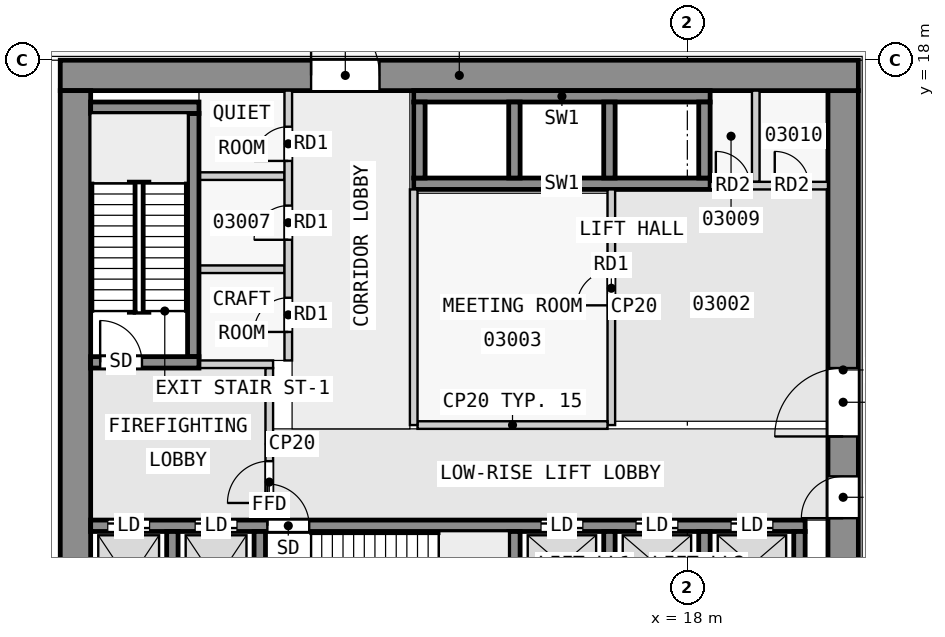
"""IFC4 building model, lengths in metres.
Left out: names, types, materials, properties, quantities, classifications, styles, units other than length and angle.
Written with IfcOpenShell. Run it as: python <this file> out.ifc"""

import sys

from ifc_helpers import new_model, si_unit, direction, frame, frame_2d, origin, place, context, subcontext, project, spatial, rectangle, extrude, element, fill, save


model = new_model("IFC4")
c1 = context("Model", 3, precision=1e-05, world=origin(), true_north=direction((0.0, 1.0)))
c2 = subcontext(c1, "Body", "Model", "MODEL_VIEW")
j1 = project(units=[si_unit("LENGTHUNIT", "METRE"), si_unit("PLANEANGLEUNIT", "RADIAN")], contexts=[c1])
p1 = place(None, origin())
s1 = spatial("IfcSite", under=j1, at=p1, CompositionType="ELEMENT")
p2 = place(p1, origin())
s2 = spatial("IfcBuilding", under=s1, at=p2, CompositionType="ELEMENT")
p3 = place(p2, frame((0.0, 0.0, 17.3)))
s3 = spatial("IfcBuildingStorey", under=s2, at=p3, CompositionType="ELEMENT", Elevation=17.3)
p4 = place(p3, frame((1.5, 17.6, 0.0), z_axis=(0.0, 0.0, 1.0), x_axis=(1.0, 0.0, 0.0)))
e1 = element("IfcWall", 1, at=p4, inside=s3, PredefinedType="SHEAR", context=c2, shape_type="SweptSolid", body=[
    extrude(rectangle(XDim=21.0, YDim=0.8, at=frame_2d((10.5, 0.0))), origin(), (0.0, 0.0, 1.0), 4.15),
])
p5 = place(p4, frame((6.6, 0.0, 0.0)))
e2 = element("IfcOpeningElement", 2, at=p5, cuts=e1, PredefinedType="OPENING", context=c2, shape_type="SweptSolid", body=[
    extrude(rectangle(XDim=1.8, YDim=2.1, at=frame_2d((0.9, 1.05))), frame((0.0, 0.41, 0.0), z_axis=(0.0, -1.0, 0.0), x_axis=(1.0, 0.0, 0.0)), (0.0, 0.0, 1.0), 0.82),
])
p6 = place(p3, frame((1.9, 2.5, 0.0), z_axis=(0.0, 0.0, 1.0), x_axis=(0.0, 1.0, 0.0)))
e3 = element("IfcWall", 3, at=p6, inside=s3, PredefinedType="SHEAR", context=c2, shape_type="SweptSolid", body=[
    extrude(rectangle(XDim=14.7, YDim=0.8, at=frame_2d((7.35, 0.0))), origin(), (0.0, 0.0, 1.0), 4.15),
])
p7 = place(p3, frame((22.1, 2.5, 0.0), z_axis=(0.0, 0.0, 1.0), x_axis=(0.0, 1.0, 0.0)))
e4 = element("IfcWall", 4, at=p7, inside=s3, PredefinedType="SHEAR", context=c2, shape_type="SweptSolid", body=[
    extrude(rectangle(XDim=14.7, YDim=0.8, at=frame_2d((7.35, 0.0))), origin(), (0.0, 0.0, 1.0), 4.15),
])
p8 = place(p7, frame((5.6, 0.0, 0.0)))
e5 = element("IfcOpeningElement", 5, at=p8, cuts=e4, PredefinedType="OPENING", context=c2, shape_type="SweptSolid", body=[
    extrude(rectangle(XDim=1.8, YDim=2.1, at=frame_2d((0.9, 1.05))), frame((0.0, 0.41, 0.0), z_axis=(0.0, -1.0, 0.0), x_axis=(1.0, 0.0, 0.0)), (0.0, 0.0, 1.0), 0.82),
])
p9 = place(p7, frame((3.45, 0.0, 0.0)))
e6 = element("IfcOpeningElement", 6, at=p9, cuts=e4, PredefinedType="OPENING", context=c2, shape_type="SweptSolid", body=[
    extrude(rectangle(XDim=1.1, YDim=2.1, at=frame_2d((0.55, 1.05))), frame((0.0, 0.41, 0.0), z_axis=(0.0, -1.0, 0.0), x_axis=(1.0, 0.0, 0.0)), (0.0, 0.0, 1.0), 0.82),
])
for number, where, z_axis, x_axis in (
    (7, (4.45, 2.8, 0.0), (0.0, 0.0, 1.0), (0.0, 1.0, 0.0)),
    (8, (6.75, 2.8, 0.0), (0.0, 0.0, 1.0), (0.0, 1.0, 0.0)),
    (9, (13.45, 2.8, 0.0), (0.0, 0.0, 1.0), (0.0, 1.0, 0.0)),
    (10, (15.95, 2.8, 0.0), (0.0, 0.0, 1.0), (0.0, 1.0, 0.0)),
    (11, (18.45, 2.8, 0.0), (0.0, 0.0, 1.0), (0.0, 1.0, 0.0)),
    (12, (20.95, 2.8, 0.0), (0.0, 0.0, 1.0), (0.0, 1.0, 0.0)),
):
    element("IfcWall", number, at=place(p3, frame(where, z_axis=z_axis, x_axis=x_axis)), inside=s3, PredefinedType="SHEAR", context=c2, shape_type="SweptSolid", body=[
        extrude(rectangle(XDim=2.8, YDim=0.3, at=frame_2d((1.4, 0.0))), origin(), (0.0, 0.0, 1.0), 4.15),
    ])
p10 = place(p3, frame((2.3, 5.75, 0.0), z_axis=(0.0, 0.0, 1.0), x_axis=(1.0, 0.0, 0.0)))
e13 = element("IfcWall", 13, at=p10, inside=s3, PredefinedType="SHEAR", context=c2, shape_type="SweptSolid", body=[
    extrude(rectangle(XDim=18.8, YDim=0.3, at=frame_2d((9.4, 0.0))), origin(), (0.0, 0.0, 1.0), 4.15),
])
p11 = place(p10, frame((4.65, 0.0, 0.0)))
e14 = element("IfcOpeningElement", 14, at=p11, cuts=e13, PredefinedType="OPENING", context=c2, shape_type="SweptSolid", body=[
    extrude(rectangle(XDim=1.1, YDim=2.1, at=frame_2d((0.55, 1.05))), frame((0.0, 0.16, 0.0), z_axis=(0.0, -1.0, 0.0), x_axis=(1.0, 0.0, 0.0)), (0.0, 0.0, 1.0), 0.32),
])
p12 = place(p10, frame((0.45, 0.0, 0.0)))
e15 = element("IfcOpeningElement", 15, at=p12, cuts=e13, PredefinedType="OPENING", context=c2, shape_type="SweptSolid", body=[
    extrude(rectangle(XDim=1.1, YDim=2.1, at=frame_2d((0.55, 1.05))), frame((0.0, 0.16, 0.0), z_axis=(0.0, -1.0, 0.0), x_axis=(1.0, 0.0, 0.0)), (0.0, 0.0, 1.0), 0.32),
])
p13 = place(p10, frame((2.75, 0.0, 0.0)))
e16 = element("IfcOpeningElement", 16, at=p13, cuts=e13, PredefinedType="OPENING", context=c2, shape_type="SweptSolid", body=[
    extrude(rectangle(XDim=1.1, YDim=2.1, at=frame_2d((0.55, 1.05))), frame((0.0, 0.16, 0.0), z_axis=(0.0, -1.0, 0.0), x_axis=(1.0, 0.0, 0.0)), (0.0, 0.0, 1.0), 0.32),
])
p14 = place(p10, frame((11.85, 0.0, 0.0)))
e17 = element("IfcOpeningElement", 17, at=p14, cuts=e13, PredefinedType="OPENING", context=c2, shape_type="SweptSolid", body=[
    extrude(rectangle(XDim=1.1, YDim=2.1, at=frame_2d((0.55, 1.05))), frame((0.0, 0.16, 0.0), z_axis=(0.0, -1.0, 0.0), x_axis=(1.0, 0.0, 0.0)), (0.0, 0.0, 1.0), 0.32),
])
p15 = place(p10, frame((14.35, 0.0, 0.0)))
e18 = element("IfcOpeningElement", 18, at=p15, cuts=e13, PredefinedType="OPENING", context=c2, shape_type="SweptSolid", body=[
    extrude(rectangle(XDim=1.1, YDim=2.1, at=frame_2d((0.55, 1.05))), frame((0.0, 0.16, 0.0), z_axis=(0.0, -1.0, 0.0), x_axis=(1.0, 0.0, 0.0)), (0.0, 0.0, 1.0), 0.32),
])
p16 = place(p10, frame((16.85, 0.0, 0.0)))
e19 = element("IfcOpeningElement", 19, at=p16, cuts=e13, PredefinedType="OPENING", context=c2, shape_type="SweptSolid", body=[
    extrude(rectangle(XDim=1.1, YDim=2.1, at=frame_2d((0.55, 1.05))), frame((0.0, 0.16, 0.0), z_axis=(0.0, -1.0, 0.0), x_axis=(1.0, 0.0, 0.0)), (0.0, 0.0, 1.0), 0.32),
])
p17 = place(p3, frame((2.3, 10.05, 0.0), z_axis=(0.0, 0.0, 1.0), x_axis=(1.0, 0.0, 0.0)))
e20 = element("IfcWall", 20, at=p17, inside=s3, PredefinedType="SHEAR", context=c2, shape_type="SweptSolid", body=[
    extrude(rectangle(XDim=2.85, YDim=0.3, at=frame_2d((1.425, 0.0))), origin(), (0.0, 0.0, 1.0), 4.15),
])
p18 = place(p17, frame((0.25, 0.0, 0.0)))
e21 = element("IfcOpeningElement", 21, at=p18, cuts=e20, PredefinedType="OPENING", context=c2, shape_type="SweptSolid", body=[
    extrude(rectangle(XDim=1.1, YDim=2.1, at=frame_2d((0.55, 1.05))), frame((0.0, 0.16, 0.0), z_axis=(0.0, -1.0, 0.0), x_axis=(1.0, 0.0, 0.0)), (0.0, 0.0, 1.0), 0.32),
])
p19 = place(p3, frame((5.0, 10.2, 0.0), z_axis=(0.0, 0.0, 1.0), x_axis=(0.0, 1.0, 0.0)))
e22 = element("IfcWall", 22, at=p19, inside=s3, PredefinedType="SHEAR", context=c2, shape_type="SweptSolid", body=[
    extrude(rectangle(XDim=6.4, YDim=0.3, at=frame_2d((3.2, 0.0))), origin(), (0.0, 0.0, 1.0), 4.15),
])
p20 = place(p3, frame((2.3, 16.75, 0.0), z_axis=(0.0, 0.0, 1.0), x_axis=(1.0, 0.0, 0.0)))
e23 = element("IfcWall", 23, at=p20, inside=s3, PredefinedType="SHEAR", context=c2, shape_type="SweptSolid", body=[
    extrude(rectangle(XDim=2.85, YDim=0.3, at=frame_2d((1.425, 0.0))), origin(), (0.0, 0.0, 1.0), 4.15),
])
for number, where, z_axis, x_axis in (
    (24, (10.8, 17.05, 0.0), (0.0, 0.0, 1.0), (1.0, 0.0, 0.0)),
    (25, (10.8, 14.75, 0.0), (0.0, 0.0, 1.0), (1.0, 0.0, 0.0)),
):
    element("IfcWall", number, at=place(p3, frame(where, z_axis=z_axis, x_axis=x_axis)), inside=s3, PredefinedType="SHEAR", context=c2, shape_type="SweptSolid", body=[
        extrude(rectangle(XDim=7.8, YDim=0.3, at=frame_2d((3.9, 0.0))), origin(), (0.0, 0.0, 1.0), 4.15),
    ])
for number, where, z_axis, x_axis in (
    (26, (10.95, 14.9, 0.0), (0.0, 0.0, 1.0), (0.0, 1.0, 0.0)),
    (27, (13.45, 14.9, 0.0), (0.0, 0.0, 1.0), (0.0, 1.0, 0.0)),
    (28, (15.95, 14.9, 0.0), (0.0, 0.0, 1.0), (0.0, 1.0, 0.0)),
    (29, (18.45, 14.9, 0.0), (0.0, 0.0, 1.0), (0.0, 1.0, 0.0)),
):
    element("IfcWall", number, at=place(p3, frame(where, z_axis=z_axis, x_axis=x_axis)), inside=s3, PredefinedType="SHEAR", context=c2, shape_type="SweptSolid", body=[
        extrude(rectangle(XDim=2.0, YDim=0.3, at=frame_2d((1.0, 0.0))), origin(), (0.0, 0.0, 1.0), 4.15),
    ])
p21 = place(p3, frame((7.0, 5.9, 0.0), z_axis=(0.0, 0.0, 1.0), x_axis=(0.0, 1.0, 0.0)))
e30 = element("IfcWall", 30, at=p21, inside=s3, PredefinedType="PARTITIONING", context=c2, shape_type="SweptSolid", body=[
    extrude(rectangle(XDim=4.0, YDim=0.2, at=frame_2d((2.0, 0.0))), origin(), (0.0, 0.0, 1.0), 4.15),
])
p22 = place(p21, frame((0.45, 0.0, 0.0)))
e31 = element("IfcOpeningElement", 31, at=p22, cuts=e30, PredefinedType="OPENING", context=c2, shape_type="SweptSolid", body=[
    extrude(rectangle(XDim=1.1, YDim=2.1, at=frame_2d((0.55, 1.05))), frame((0.0, 0.11, 0.0), z_axis=(0.0, -1.0, 0.0), x_axis=(1.0, 0.0, 0.0)), (0.0, 0.0, 1.0), 0.22),
])
p23 = place(p3, frame((5.15, 10.0, 0.0), z_axis=(0.0, 0.0, 1.0), x_axis=(1.0, 0.0, 0.0)))
e32 = element("IfcWall", 32, at=p23, inside=s3, PredefinedType="PARTITIONING", context=c2, shape_type="SweptSolid", body=[
    extrude(rectangle(XDim=1.95, YDim=0.2, at=frame_2d((0.975, 0.0))), origin(), (0.0, 0.0, 1.0), 4.15),
])
p24 = place(p3, frame((10.8, 8.4, 0.0), z_axis=(0.0, 0.0, 1.0), x_axis=(0.0, 1.0, 0.0)))
e33 = element("IfcWall", 33, at=p24, inside=s3, PredefinedType="PARTITIONING", context=c2, shape_type="SweptSolid", body=[
    extrude(rectangle(XDim=6.2, YDim=0.2, at=frame_2d((3.1, 0.0))), origin(), (0.0, 0.0, 1.0), 4.15),
])
p25 = place(p3, frame((10.9, 8.4, 0.0), z_axis=(0.0, 0.0, 1.0), x_axis=(1.0, 0.0, 0.0)))
e34 = element("IfcWall", 34, at=p25, inside=s3, PredefinedType="PARTITIONING", context=c2, shape_type="SweptSolid", body=[
    extrude(rectangle(XDim=5.0, YDim=0.2, at=frame_2d((2.5, 0.0))), origin(), (0.0, 0.0, 1.0), 4.15),
])
p26 = place(p3, frame((16.0, 8.4, 0.0), z_axis=(0.0, 0.0, 1.0), x_axis=(0.0, 1.0, 0.0)))
e35 = element("IfcWall", 35, at=p26, inside=s3, PredefinedType="PARTITIONING", context=c2, shape_type="SweptSolid", body=[
    extrude(rectangle(XDim=6.2, YDim=0.2, at=frame_2d((3.1, 0.0))), origin(), (0.0, 0.0, 1.0), 4.15),
])
p27 = place(p26, frame((3.15, 0.0, 0.0)))
e36 = element("IfcOpeningElement", 36, at=p27, cuts=e35, PredefinedType="OPENING", context=c2, shape_type="SweptSolid", body=[
    extrude(rectangle(XDim=0.9, YDim=2.1, at=frame_2d((0.45, 1.05))), frame((0.0, 0.11, 0.0), z_axis=(0.0, -1.0, 0.0), x_axis=(1.0, 0.0, 0.0)), (0.0, 0.0, 1.0), 0.22),
])
p28 = place(p3, frame((7.5, 10.1, 0.0), z_axis=(0.0, 0.0, 1.0), x_axis=(0.0, 1.0, 0.0)))
e37 = element("IfcWall", 37, at=p28, inside=s3, PredefinedType="PARTITIONING", context=c2, shape_type="SweptSolid", body=[
    extrude(rectangle(XDim=7.1, YDim=0.2, at=frame_2d((3.55, 0.0))), origin(), (0.0, 0.0, 1.0), 4.15),
])
p29 = place(p28, frame((0.75, 0.0, 0.0)))
e38 = element("IfcOpeningElement", 38, at=p29, cuts=e37, PredefinedType="OPENING", context=c2, shape_type="SweptSolid", body=[
    extrude(rectangle(XDim=0.9, YDim=2.1, at=frame_2d((0.45, 1.05))), frame((0.0, 0.11, 0.0), z_axis=(0.0, -1.0, 0.0), x_axis=(1.0, 0.0, 0.0)), (0.0, 0.0, 1.0), 0.22),
])
p30 = place(p28, frame((3.175, 0.0, 0.0)))
e39 = element("IfcOpeningElement", 39, at=p30, cuts=e37, PredefinedType="OPENING", context=c2, shape_type="SweptSolid", body=[
    extrude(rectangle(XDim=0.9, YDim=2.1, at=frame_2d((0.45, 1.05))), frame((0.0, 0.11, 0.0), z_axis=(0.0, -1.0, 0.0), x_axis=(1.0, 0.0, 0.0)), (0.0, 0.0, 1.0), 0.22),
])
p31 = place(p28, frame((5.25, 0.0, 0.0)))
e40 = element("IfcOpeningElement", 40, at=p31, cuts=e37, PredefinedType="OPENING", context=c2, shape_type="SweptSolid", body=[
    extrude(rectangle(XDim=0.9, YDim=2.1, at=frame_2d((0.45, 1.05))), frame((0.0, 0.11, 0.0), z_axis=(0.0, -1.0, 0.0), x_axis=(1.0, 0.0, 0.0)), (0.0, 0.0, 1.0), 0.22),
])
for number, where, z_axis, x_axis in (
    (41, (5.15, 12.5, 0.0), (0.0, 0.0, 1.0), (1.0, 0.0, 0.0)),
    (42, (5.15, 14.95, 0.0), (0.0, 0.0, 1.0), (1.0, 0.0, 0.0)),
):
    element("IfcWall", number, at=place(p3, frame(where, z_axis=z_axis, x_axis=x_axis)), inside=s3, PredefinedType="PARTITIONING", context=c2, shape_type="SweptSolid", body=[
        extrude(rectangle(XDim=2.25, YDim=0.2, at=frame_2d((1.125, 0.0))), origin(), (0.0, 0.0, 1.0), 4.15),
    ])
p32 = place(p3, frame((18.6, 14.7, 0.0), z_axis=(0.0, 0.0, 1.0), x_axis=(1.0, 0.0, 0.0)))
e43 = element("IfcWall", 43, at=p32, inside=s3, PredefinedType="PARTITIONING", context=c2, shape_type="SweptSolid", body=[
    extrude(rectangle(XDim=3.1, YDim=0.2, at=frame_2d((1.55, 0.0))), origin(), (0.0, 0.0, 1.0), 4.15),
])
p33 = place(p32, frame((0.15, 0.0, 0.0)))
e44 = element("IfcOpeningElement", 44, at=p33, cuts=e43, PredefinedType="OPENING", context=c2, shape_type="SweptSolid", body=[
    extrude(rectangle(XDim=0.9, YDim=2.1, at=frame_2d((0.45, 1.05))), frame((0.0, 0.11, 0.0), z_axis=(0.0, -1.0, 0.0), x_axis=(1.0, 0.0, 0.0)), (0.0, 0.0, 1.0), 0.22),
])
p34 = place(p32, frame((1.7, 0.0, 0.0)))
e45 = element("IfcOpeningElement", 45, at=p34, cuts=e43, PredefinedType="OPENING", context=c2, shape_type="SweptSolid", body=[
    extrude(rectangle(XDim=0.9, YDim=2.1, at=frame_2d((0.45, 1.05))), frame((0.0, 0.11, 0.0), z_axis=(0.0, -1.0, 0.0), x_axis=(1.0, 0.0, 0.0)), (0.0, 0.0, 1.0), 0.22),
])
p35 = place(p3, frame((19.8, 14.8, 0.0), z_axis=(0.0, 0.0, 1.0), x_axis=(0.0, 1.0, 0.0)))
e46 = element("IfcWall", 46, at=p35, inside=s3, PredefinedType="PARTITIONING", context=c2, shape_type="SweptSolid", body=[
    extrude(rectangle(XDim=2.4, YDim=0.2, at=frame_2d((1.2, 0.0))), origin(), (0.0, 0.0, 1.0), 4.15),
])
p36 = place(p22, origin())
e47 = element("IfcDoor", 47, at=p36, inside=s3, OperationType="SINGLE_SWING_LEFT", PredefinedType="DOOR", context=c2, shape_type="SweptSolid", body=[
    extrude(rectangle(XDim=1.1, YDim=2.1, at=frame_2d((0.55, 1.05))), frame((0.0, 0.025, 0.0), z_axis=(0.0, -1.0, 0.0), x_axis=(1.0, 0.0, 0.0)), (0.0, 0.0, 1.0), 0.05),
])
fill(e31, e47)
p37 = place(p18, origin())
e48 = element("IfcDoor", 48, at=p37, inside=s3, OperationType="SINGLE_SWING_RIGHT", PredefinedType="DOOR", context=c2, shape_type="SweptSolid", body=[
    extrude(rectangle(XDim=1.1, YDim=2.1, at=frame_2d((0.55, 1.05))), frame((0.0, 0.025, 0.0), z_axis=(0.0, -1.0, 0.0), x_axis=(1.0, 0.0, 0.0)), (0.0, 0.0, 1.0), 0.05),
])
fill(e21, e48)
p38 = place(p27, origin())
e49 = element("IfcDoor", 49, at=p38, inside=s3, OperationType="SINGLE_SWING_LEFT", PredefinedType="DOOR", context=c2, shape_type="SweptSolid", body=[
    extrude(rectangle(XDim=0.9, YDim=2.1, at=frame_2d((0.45, 1.05))), frame((0.0, 0.025, 0.0), z_axis=(0.0, -1.0, 0.0), x_axis=(1.0, 0.0, 0.0)), (0.0, 0.0, 1.0), 0.05),
])
fill(e36, e49)
p39 = place(p11, origin())
e50 = element("IfcDoor", 50, at=p39, inside=s3, OperationType="SINGLE_SWING_LEFT", PredefinedType="DOOR", context=c2, shape_type="SweptSolid", body=[
    extrude(rectangle(XDim=1.1, YDim=2.1, at=frame_2d((0.55, 1.05))), frame((0.0, 0.025, 0.0), z_axis=(0.0, -1.0, 0.0), x_axis=(1.0, 0.0, 0.0)), (0.0, 0.0, 1.0), 0.05),
])
fill(e14, e50)
p40 = place(p12, origin())
e51 = element("IfcDoor", 51, at=p40, inside=s3, OperationType="DOUBLE_DOOR_SLIDING", PredefinedType="DOOR", context=c2, shape_type="SweptSolid", body=[
    extrude(rectangle(XDim=1.1, YDim=2.1, at=frame_2d((0.55, 1.05))), frame((0.0, 0.025, 0.0), z_axis=(0.0, -1.0, 0.0), x_axis=(1.0, 0.0, 0.0)), (0.0, 0.0, 1.0), 0.05),
])
fill(e15, e51)
p41 = place(p13, origin())
e52 = element("IfcDoor", 52, at=p41, inside=s3, OperationType="DOUBLE_DOOR_SLIDING", PredefinedType="DOOR", context=c2, shape_type="SweptSolid", body=[
    extrude(rectangle(XDim=1.1, YDim=2.1, at=frame_2d((0.55, 1.05))), frame((0.0, 0.025, 0.0), z_axis=(0.0, -1.0, 0.0), x_axis=(1.0, 0.0, 0.0)), (0.0, 0.0, 1.0), 0.05),
])
fill(e16, e52)
p42 = place(p14, origin())
e53 = element("IfcDoor", 53, at=p42, inside=s3, OperationType="DOUBLE_DOOR_SLIDING", PredefinedType="DOOR", context=c2, shape_type="SweptSolid", body=[
    extrude(rectangle(XDim=1.1, YDim=2.1, at=frame_2d((0.55, 1.05))), frame((0.0, 0.025, 0.0), z_axis=(0.0, -1.0, 0.0), x_axis=(1.0, 0.0, 0.0)), (0.0, 0.0, 1.0), 0.05),
])
fill(e17, e53)
p43 = place(p15, origin())
e54 = element("IfcDoor", 54, at=p43, inside=s3, OperationType="DOUBLE_DOOR_SLIDING", PredefinedType="DOOR", context=c2, shape_type="SweptSolid", body=[
    extrude(rectangle(XDim=1.1, YDim=2.1, at=frame_2d((0.55, 1.05))), frame((0.0, 0.025, 0.0), z_axis=(0.0, -1.0, 0.0), x_axis=(1.0, 0.0, 0.0)), (0.0, 0.0, 1.0), 0.05),
])
fill(e18, e54)
p44 = place(p16, origin())
e55 = element("IfcDoor", 55, at=p44, inside=s3, OperationType="DOUBLE_DOOR_SLIDING", PredefinedType="DOOR", context=c2, shape_type="SweptSolid", body=[
    extrude(rectangle(XDim=1.1, YDim=2.1, at=frame_2d((0.55, 1.05))), frame((0.0, 0.025, 0.0), z_axis=(0.0, -1.0, 0.0), x_axis=(1.0, 0.0, 0.0)), (0.0, 0.0, 1.0), 0.05),
])
fill(e19, e55)
p45 = place(p8, origin())
e56 = element("IfcDoor", 56, at=p45, inside=s3, OperationType="DOUBLE_DOOR_SINGLE_SWING", PredefinedType="DOOR", context=c2, shape_type="SweptSolid", body=[
    extrude(rectangle(XDim=1.8, YDim=2.1, at=frame_2d((0.9, 1.05))), frame((0.0, 0.025, 0.0), z_axis=(0.0, -1.0, 0.0), x_axis=(1.0, 0.0, 0.0)), (0.0, 0.0, 1.0), 0.05),
])
fill(e5, e56)
p46 = place(p9, origin())
e57 = element("IfcDoor", 57, at=p46, inside=s3, OperationType="SINGLE_SWING_RIGHT", PredefinedType="DOOR", context=c2, shape_type="SweptSolid", body=[
    extrude(rectangle(XDim=1.1, YDim=2.1, at=frame_2d((0.55, 1.05))), frame((0.0, 0.025, 0.0), z_axis=(0.0, -1.0, 0.0), x_axis=(1.0, 0.0, 0.0)), (0.0, 0.0, 1.0), 0.05),
])
fill(e6, e57)
p47 = place(p5, origin())
e58 = element("IfcDoor", 58, at=p47, inside=s3, OperationType="DOUBLE_DOOR_SINGLE_SWING", PredefinedType="DOOR", context=c2, shape_type="SweptSolid", body=[
    extrude(rectangle(XDim=1.8, YDim=2.1, at=frame_2d((0.9, 1.05))), frame((0.0, 0.025, 0.0), z_axis=(0.0, -1.0, 0.0), x_axis=(1.0, 0.0, 0.0)), (0.0, 0.0, 1.0), 0.05),
])
fill(e2, e58)
p48 = place(p29, origin())
e59 = element("IfcDoor", 59, at=p48, inside=s3, OperationType="SINGLE_SWING_RIGHT", PredefinedType="DOOR", context=c2, shape_type="SweptSolid", body=[
    extrude(rectangle(XDim=0.9, YDim=2.1, at=frame_2d((0.45, 1.05))), frame((0.0, 0.025, 0.0), z_axis=(0.0, -1.0, 0.0), x_axis=(1.0, 0.0, 0.0)), (0.0, 0.0, 1.0), 0.05),
])
fill(e38, e59)
p49 = place(p30, origin())
e60 = element("IfcDoor", 60, at=p49, inside=s3, OperationType="SINGLE_SWING_RIGHT", PredefinedType="DOOR", context=c2, shape_type="SweptSolid", body=[
    extrude(rectangle(XDim=0.9, YDim=2.1, at=frame_2d((0.45, 1.05))), frame((0.0, 0.025, 0.0), z_axis=(0.0, -1.0, 0.0), x_axis=(1.0, 0.0, 0.0)), (0.0, 0.0, 1.0), 0.05),
])
fill(e39, e60)
p50 = place(p31, origin())
e61 = element("IfcDoor", 61, at=p50, inside=s3, OperationType="SINGLE_SWING_RIGHT", PredefinedType="DOOR", context=c2, shape_type="SweptSolid", body=[
    extrude(rectangle(XDim=0.9, YDim=2.1, at=frame_2d((0.45, 1.05))), frame((0.0, 0.025, 0.0), z_axis=(0.0, -1.0, 0.0), x_axis=(1.0, 0.0, 0.0)), (0.0, 0.0, 1.0), 0.05),
])
fill(e40, e61)
p51 = place(p33, origin())
e62 = element("IfcDoor", 62, at=p51, inside=s3, OperationType="SINGLE_SWING_LEFT", PredefinedType="DOOR", context=c2, shape_type="SweptSolid", body=[
    extrude(rectangle(XDim=0.9, YDim=2.1, at=frame_2d((0.45, 1.05))), frame((0.0, 0.025, 0.0), z_axis=(0.0, -1.0, 0.0), x_axis=(1.0, 0.0, 0.0)), (0.0, 0.0, 1.0), 0.05),
])
fill(e44, e62)
p52 = place(p34, origin())
e63 = element("IfcDoor", 63, at=p52, inside=s3, OperationType="SINGLE_SWING_LEFT", PredefinedType="DOOR", context=c2, shape_type="SweptSolid", body=[
    extrude(rectangle(XDim=0.9, YDim=2.1, at=frame_2d((0.45, 1.05))), frame((0.0, 0.025, 0.0), z_axis=(0.0, -1.0, 0.0), x_axis=(1.0, 0.0, 0.0)), (0.0, 0.0, 1.0), 0.05),
])
fill(e45, e63)
save(model, sys.argv[1])
